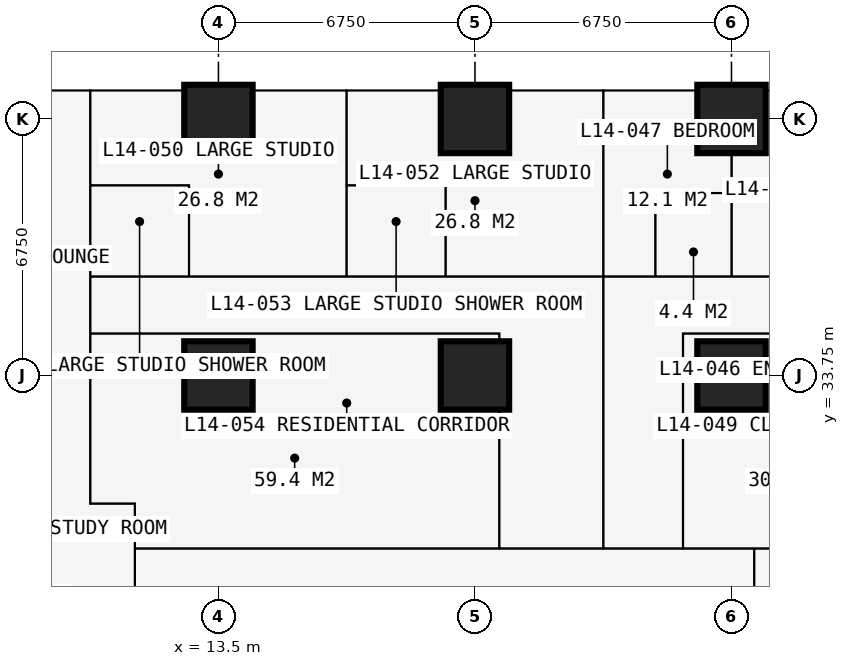
"""IFC4 building model, lengths in metres.
Left out: names, types, materials, properties, quantities, classifications, styles, units other than length and angle.
Written with IfcOpenShell. Run it as: python <this file> out.ifc"""

import sys

from ifc_helpers import new_model, si_unit, direction, frame, frame_2d, origin, origin_2d, place, context, subcontext, project, spatial, rectangle, extrude, element, fill, save


model = new_model("IFC4")
c1 = context("Model", 3, precision=1e-05, world=origin(), true_north=direction((0.0, 1.0)))
c2 = subcontext(c1, "Body", "Model", "MODEL_VIEW")
j1 = project(units=[si_unit("LENGTHUNIT", "METRE"), si_unit("PLANEANGLEUNIT", "RADIAN")], contexts=[c1])
p1 = place(None, origin())
s1 = spatial("IfcSite", under=j1, at=p1, CompositionType="ELEMENT")
p2 = place(p1, origin())
s2 = spatial("IfcBuilding", under=s1, at=p2, CompositionType="ELEMENT")
p3 = place(p2, frame((0.0, 0.0, 54.0)))
s3 = spatial("IfcBuildingStorey", under=s2, at=p3, CompositionType="ELEMENT", Elevation=54.0)
for number, where, z_axis, x_axis in (
    (1, (13.5, 33.75, 0.0), (0.0, 0.0, 1.0), (1.0, 0.0, 0.0)),
    (2, (13.5, 40.5, 0.0), (0.0, 0.0, 1.0), (1.0, 0.0, 0.0)),
    (3, (20.25, 33.75, 0.0), (0.0, 0.0, 1.0), (1.0, 0.0, 0.0)),
    (4, (20.25, 40.5, 0.0), (0.0, 0.0, 1.0), (1.0, 0.0, 0.0)),
    (5, (27.0, 33.75, 0.0), (0.0, 0.0, 1.0), (1.0, 0.0, 0.0)),
    (6, (27.0, 40.5, 0.0), (0.0, 0.0, 1.0), (1.0, 0.0, 0.0)),
):
    element("IfcColumn", number, at=place(p3, frame(where, z_axis=z_axis, x_axis=x_axis)), inside=s3, PredefinedType="COLUMN", context=c2, shape_type="SweptSolid", body=[
        extrude(rectangle(XDim=1.8, YDim=1.8, at=origin_2d()), origin(), (0.0, 0.0, 1.0), 3.6),
    ])
p4 = place(p3, frame((13.5, 41.25, 0.0), z_axis=(0.0, 0.0, 1.0), x_axis=(1.0, 0.0, 0.0)))
e7 = element("IfcWall", 7, at=p4, inside=s3, PredefinedType="SOLIDWALL", context=c2, shape_type="SweptSolid", body=[
    extrude(rectangle(XDim=6.75, YDim=0.15, at=frame_2d((3.375, 0.0))), origin(), (0.0, 0.0, 1.0), 3.375),
])
p5 = place(p4, frame((0.962, 0.0, 0.0)))
e8 = element("IfcOpeningElement", 8, at=p5, cuts=e7, PredefinedType="OPENING", context=c2, shape_type="SweptSolid", body=[
    extrude(rectangle(XDim=1.0, YDim=2.2, at=frame_2d((0.5, 1.1))), frame((0.0, 0.085, 0.0), z_axis=(0.0, -1.0, 0.0), x_axis=(1.0, 0.0, 0.0)), (0.0, 0.0, 1.0), 0.17),
])
p6 = place(p4, frame((2.025, 0.0, 0.9)))
e9 = element("IfcOpeningElement", 9, at=p6, cuts=e7, PredefinedType="OPENING", context=c2, shape_type="SweptSolid", body=[
    extrude(rectangle(XDim=1.2, YDim=1.8, at=frame_2d((0.6, 0.9))), frame((0.0, 0.085, 0.0), z_axis=(0.0, -1.0, 0.0), x_axis=(1.0, 0.0, 0.0)), (0.0, 0.0, 1.0), 0.17),
])
p7 = place(p4, frame((4.788, 0.0, 0.0)))
e10 = element("IfcOpeningElement", 10, at=p7, cuts=e7, PredefinedType="OPENING", context=c2, shape_type="SweptSolid", body=[
    extrude(rectangle(XDim=1.0, YDim=2.2, at=frame_2d((0.5, 1.1))), frame((0.0, 0.085, 0.0), z_axis=(0.0, -1.0, 0.0), x_axis=(1.0, 0.0, 0.0)), (0.0, 0.0, 1.0), 0.17),
])
p8 = place(p4, frame((3.525, 0.0, 0.9)))
e11 = element("IfcOpeningElement", 11, at=p8, cuts=e7, PredefinedType="OPENING", context=c2, shape_type="SweptSolid", body=[
    extrude(rectangle(XDim=1.2, YDim=1.8, at=frame_2d((0.6, 0.9))), frame((0.0, 0.085, 0.0), z_axis=(0.0, -1.0, 0.0), x_axis=(1.0, 0.0, 0.0)), (0.0, 0.0, 1.0), 0.17),
])
p9 = place(p3, frame((16.875, 41.35, 0.0), z_axis=(0.0, 0.0, 1.0), x_axis=(0.0, 1.0, 0.0)))
e12 = element("IfcWall", 12, at=p9, inside=s3, PredefinedType="USERDEFINED", context=c2, shape_type="SweptSolid", body=[
    extrude(rectangle(XDim=2.2, YDim=1.0, at=frame_2d((1.1, 0.0))), origin(), (0.0, 0.0, 1.0), 0.9),
])
p10 = place(p3, frame((4.15, 33.75, 0.0), z_axis=(0.0, 0.0, 1.0), x_axis=(1.0, 0.0, 0.0)))
e13 = element("IfcWall", 13, at=p10, inside=s3, PredefinedType="PARTITIONING", context=c2, shape_type="SweptSolid", body=[
    extrude(rectangle(XDim=5.975, YDim=0.15, at=frame_2d((2.988, 0.0))), origin(), (0.0, 0.0, 1.0), 2.877),
])
p11 = place(p3, frame((10.125, 30.375, 0.0), z_axis=(0.0, 0.0, 1.0), x_axis=(0.0, 1.0, 0.0)))
e14 = element("IfcWall", 14, at=p11, inside=s3, PredefinedType="PARTITIONING", context=c2, shape_type="SweptSolid", body=[
    extrude(rectangle(XDim=10.859, YDim=0.15, at=frame_2d((5.429, 0.0))), origin(), (0.0, 0.0, 1.0), 3.375),
])
p12 = place(p11, frame((4.725, 0.0, 0.0)))
e15 = element("IfcOpeningElement", 15, at=p12, cuts=e14, PredefinedType="OPENING", context=c2, shape_type="SweptSolid", body=[
    extrude(rectangle(XDim=1.0, YDim=2.2, at=frame_2d((0.5, 1.1))), frame((0.0, 0.085, 0.0), z_axis=(0.0, -1.0, 0.0), x_axis=(1.0, 0.0, 0.0)), (0.0, 0.0, 1.0), 0.17),
])
p13 = place(p3, frame((10.125, 30.375, 0.0), z_axis=(0.0, 0.0, 1.0), x_axis=(1.0, 0.0, 0.0)))
e16 = element("IfcWall", 16, at=p13, inside=s3, PredefinedType="PARTITIONING", context=c2, shape_type="SweptSolid", body=[
    extrude(rectangle(XDim=1.175, YDim=0.15, at=frame_2d((0.587, 0.0))), origin(), (0.0, 0.0, 1.0), 3.375),
])
p14 = place(p3, frame((10.125, 34.85, 0.0), z_axis=(0.0, 0.0, 1.0), x_axis=(1.0, 0.0, 0.0)))
e17 = element("IfcWall", 17, at=p14, inside=s3, PredefinedType="PARTITIONING", context=c2, shape_type="SweptSolid", body=[
    extrude(rectangle(XDim=10.762, YDim=0.15, at=frame_2d((5.381, 0.0))), origin(), (0.0, 0.0, 1.0), 3.375),
])
p15 = place(p14, frame((4.9, 0.0, 0.0)))
e18 = element("IfcOpeningElement", 18, at=p15, cuts=e17, PredefinedType="OPENING", context=c2, shape_type="SweptSolid", body=[
    extrude(rectangle(XDim=0.95, YDim=2.2, at=frame_2d((0.475, 1.1))), frame((0.0, 0.085, 0.0), z_axis=(0.0, -1.0, 0.0), x_axis=(1.0, 0.0, 0.0)), (0.0, 0.0, 1.0), 0.17),
])
p16 = place(p3, frame((10.125, 36.35, 0.0), z_axis=(0.0, 0.0, 1.0), x_axis=(1.0, 0.0, 0.0)))
e19 = element("IfcWall", 19, at=p16, inside=s3, PredefinedType="PARTITIONING", context=c2, shape_type="SweptSolid", body=[
    extrude(rectangle(XDim=23.625, YDim=0.15, at=frame_2d((11.812, 0.0))), origin(), (0.0, 0.0, 1.0), 3.375),
])
p17 = place(p16, frame((20.5, 0.0, 0.0)))
e20 = element("IfcOpeningElement", 20, at=p17, cuts=e19, PredefinedType="OPENING", context=c2, shape_type="SweptSolid", body=[
    extrude(rectangle(XDim=0.95, YDim=2.2, at=frame_2d((0.475, 1.1))), frame((0.0, 0.085, 0.0), z_axis=(0.0, -1.0, 0.0), x_axis=(1.0, 0.0, 0.0)), (0.0, 0.0, 1.0), 0.17),
])
p18 = place(p16, frame((17.125, 0.0, 0.0)))
e21 = element("IfcOpeningElement", 21, at=p18, cuts=e19, PredefinedType="OPENING", context=c2, shape_type="SweptSolid", body=[
    extrude(rectangle(XDim=0.95, YDim=2.2, at=frame_2d((0.475, 1.1))), frame((0.0, 0.085, 0.0), z_axis=(0.0, -1.0, 0.0), x_axis=(1.0, 0.0, 0.0)), (0.0, 0.0, 1.0), 0.17),
])
p19 = place(p16, frame((13.7, 0.0, 0.0)))
e22 = element("IfcOpeningElement", 22, at=p19, cuts=e19, PredefinedType="OPENING", context=c2, shape_type="SweptSolid", body=[
    extrude(rectangle(XDim=0.95, YDim=2.2, at=frame_2d((0.475, 1.1))), frame((0.0, 0.085, 0.0), z_axis=(0.0, -1.0, 0.0), x_axis=(1.0, 0.0, 0.0)), (0.0, 0.0, 1.0), 0.17),
])
p20 = place(p16, frame((4.2, 0.0, 0.0)))
e23 = element("IfcOpeningElement", 23, at=p20, cuts=e19, PredefinedType="OPENING", context=c2, shape_type="SweptSolid", body=[
    extrude(rectangle(XDim=0.95, YDim=2.2, at=frame_2d((0.475, 1.1))), frame((0.0, 0.085, 0.0), z_axis=(0.0, -1.0, 0.0), x_axis=(1.0, 0.0, 0.0)), (0.0, 0.0, 1.0), 0.17),
])
p21 = place(p16, frame((10.95, 0.0, 0.0)))
e24 = element("IfcOpeningElement", 24, at=p21, cuts=e19, PredefinedType="OPENING", context=c2, shape_type="SweptSolid", body=[
    extrude(rectangle(XDim=0.95, YDim=2.2, at=frame_2d((0.475, 1.1))), frame((0.0, 0.085, 0.0), z_axis=(0.0, -1.0, 0.0), x_axis=(1.0, 0.0, 0.0)), (0.0, 0.0, 1.0), 0.17),
])
p22 = place(p3, frame((10.125, 38.75, 0.0), z_axis=(0.0, 0.0, 1.0), x_axis=(1.0, 0.0, 0.0)))
e25 = element("IfcWall", 25, at=p22, inside=s3, PredefinedType="PARTITIONING", context=c2, shape_type="SweptSolid", body=[
    extrude(rectangle(XDim=2.6, YDim=0.1, at=frame_2d((1.3, 0.0))), origin(), (0.0, 0.0, 1.0), 3.375),
])
p23 = place(p22, frame((0.85, 0.0, 0.0)))
e26 = element("IfcOpeningElement", 26, at=p23, cuts=e25, PredefinedType="OPENING", context=c2, shape_type="SweptSolid", body=[
    extrude(rectangle(XDim=0.9, YDim=2.2, at=frame_2d((0.45, 1.1))), frame((0.0, 0.06, 0.0), z_axis=(0.0, -1.0, 0.0), x_axis=(1.0, 0.0, 0.0)), (0.0, 0.0, 1.0), 0.12),
])
p24 = place(p3, frame((11.3, 11.3, 0.0), z_axis=(0.0, 0.0, 1.0), x_axis=(0.0, 1.0, 0.0)))
e27 = element("IfcWall", 27, at=p24, inside=s3, PredefinedType="PARTITIONING", context=c2, shape_type="SweptSolid", body=[
    extrude(rectangle(XDim=19.075, YDim=0.15, at=frame_2d((9.538, 0.0))), origin(), (0.0, 0.0, 1.0), 3.375),
])
p25 = place(p24, frame((10.137, 0.0, 0.0)))
e28 = element("IfcOpeningElement", 28, at=p25, cuts=e27, PredefinedType="OPENING", context=c2, shape_type="SweptSolid", body=[
    extrude(rectangle(XDim=1.0, YDim=2.2, at=frame_2d((0.5, 1.1))), frame((0.0, 0.085, 0.0), z_axis=(0.0, -1.0, 0.0), x_axis=(1.0, 0.0, 0.0)), (0.0, 0.0, 1.0), 0.17),
])
p26 = place(p3, frame((11.3, 29.2, 0.0), z_axis=(0.0, 0.0, 1.0), x_axis=(1.0, 0.0, 0.0)))
e29 = element("IfcWall", 29, at=p26, inside=s3, PredefinedType="PARTITIONING", context=c2, shape_type="SweptSolid", body=[
    extrude(rectangle(XDim=19.075, YDim=0.15, at=frame_2d((9.538, 0.0))), origin(), (0.0, 0.0, 1.0), 3.375),
])
p27 = place(p26, frame((12.875, 0.0, 0.0)))
e30 = element("IfcOpeningElement", 30, at=p27, cuts=e29, PredefinedType="OPENING", context=c2, shape_type="SweptSolid", body=[
    extrude(rectangle(XDim=1.0, YDim=2.2, at=frame_2d((0.5, 1.1))), frame((0.0, 0.085, 0.0), z_axis=(0.0, -1.0, 0.0), x_axis=(1.0, 0.0, 0.0)), (0.0, 0.0, 1.0), 0.17),
])
p28 = place(p26, frame((10.438, 0.0, 0.0)))
e31 = element("IfcOpeningElement", 31, at=p28, cuts=e29, PredefinedType="OPENING", context=c2, shape_type="SweptSolid", body=[
    extrude(rectangle(XDim=1.0, YDim=2.2, at=frame_2d((0.5, 1.1))), frame((0.0, 0.085, 0.0), z_axis=(0.0, -1.0, 0.0), x_axis=(1.0, 0.0, 0.0)), (0.0, 0.0, 1.0), 0.17),
])
p29 = place(p26, frame((14.875, 0.0, 0.0)))
e32 = element("IfcOpeningElement", 32, at=p29, cuts=e29, PredefinedType="OPENING", context=c2, shape_type="SweptSolid", body=[
    extrude(rectangle(XDim=0.95, YDim=2.2, at=frame_2d((0.475, 1.1))), frame((0.0, 0.085, 0.0), z_axis=(0.0, -1.0, 0.0), x_axis=(1.0, 0.0, 0.0)), (0.0, 0.0, 1.0), 0.17),
])
p30 = place(p3, frame((12.725, 36.35, 0.0), z_axis=(0.0, 0.0, 1.0), x_axis=(0.0, 1.0, 0.0)))
e33 = element("IfcWall", 33, at=p30, inside=s3, PredefinedType="PARTITIONING", context=c2, shape_type="SweptSolid", body=[
    extrude(rectangle(XDim=2.4, YDim=0.1, at=frame_2d((1.2, 0.0))), origin(), (0.0, 0.0, 1.0), 3.375),
])
p31 = place(p3, frame((16.875, 36.35, 0.0), z_axis=(0.0, 0.0, 1.0), x_axis=(0.0, 1.0, 0.0)))
e34 = element("IfcWall", 34, at=p31, inside=s3, PredefinedType="PARTITIONING", context=c2, shape_type="SweptSolid", body=[
    extrude(rectangle(XDim=4.884, YDim=0.175, at=frame_2d((2.442, 0.0))), origin(), (0.0, 0.0, 1.0), 3.375),
])
p32 = place(p31, frame((0.75, 0.0, 0.0)))
e35 = element("IfcOpeningElement", 35, at=p32, cuts=e34, PredefinedType="OPENING", context=c2, shape_type="SweptSolid", body=[
    extrude(rectangle(XDim=0.9, YDim=2.2, at=frame_2d((0.45, 1.1))), frame((0.0, 0.097, 0.0), z_axis=(0.0, -1.0, 0.0), x_axis=(1.0, 0.0, 0.0)), (0.0, 0.0, 1.0), 0.195),
])
p33 = place(p3, frame((16.875, 38.75, 0.0), z_axis=(0.0, 0.0, 1.0), x_axis=(1.0, 0.0, 0.0)))
e36 = element("IfcWall", 36, at=p33, inside=s3, PredefinedType="PARTITIONING", context=c2, shape_type="SweptSolid", body=[
    extrude(rectangle(XDim=2.6, YDim=0.1, at=frame_2d((1.3, 0.0))), origin(), (0.0, 0.0, 1.0), 3.375),
])
p34 = place(p3, frame((19.475, 36.35, 0.0), z_axis=(0.0, 0.0, 1.0), x_axis=(0.0, 1.0, 0.0)))
e37 = element("IfcWall", 37, at=p34, inside=s3, PredefinedType="PARTITIONING", context=c2, shape_type="SweptSolid", body=[
    extrude(rectangle(XDim=2.4, YDim=0.1, at=frame_2d((1.2, 0.0))), origin(), (0.0, 0.0, 1.0), 3.375),
])
p35 = place(p3, frame((20.887, 29.2, 0.0), z_axis=(0.0, 0.0, 1.0), x_axis=(0.0, 1.0, 0.0)))
e38 = element("IfcWall", 38, at=p35, inside=s3, PredefinedType="PARTITIONING", context=c2, shape_type="SweptSolid", body=[
    extrude(rectangle(XDim=5.65, YDim=0.15, at=frame_2d((2.825, 0.0))), origin(), (0.0, 0.0, 1.0), 3.375),
])
p36 = place(p3, frame((23.625, 29.2, 0.0), z_axis=(0.0, 0.0, 1.0), x_axis=(0.0, 1.0, 0.0)))
e39 = element("IfcWall", 39, at=p36, inside=s3, PredefinedType="PARTITIONING", context=c2, shape_type="SweptSolid", body=[
    extrude(rectangle(XDim=12.034, YDim=0.15, at=frame_2d((6.017, 0.0))), origin(), (0.0, 0.0, 1.0), 3.375),
])
p37 = place(p3, frame((25.0, 36.35, 0.0), z_axis=(0.0, 0.0, 1.0), x_axis=(0.0, 1.0, 0.0)))
e40 = element("IfcWall", 40, at=p37, inside=s3, PredefinedType="PARTITIONING", context=c2, shape_type="SweptSolid", body=[
    extrude(rectangle(XDim=2.2, YDim=0.1, at=frame_2d((1.1, 0.0))), origin(), (0.0, 0.0, 1.0), 3.375),
])
p38 = place(p3, frame((25.0, 38.55, 0.0), z_axis=(0.0, 0.0, 1.0), x_axis=(1.0, 0.0, 0.0)))
e41 = element("IfcWall", 41, at=p38, inside=s3, PredefinedType="PARTITIONING", context=c2, shape_type="SweptSolid", body=[
    extrude(rectangle(XDim=2.0, YDim=0.1, at=frame_2d((1.0, 0.0))), origin(), (0.0, 0.0, 1.0), 3.375),
])
p39 = place(p3, frame((25.725, 29.2, 0.0), z_axis=(0.0, 0.0, 1.0), x_axis=(0.0, 1.0, 0.0)))
e42 = element("IfcWall", 42, at=p39, inside=s3, PredefinedType="PARTITIONING", context=c2, shape_type="SweptSolid", body=[
    extrude(rectangle(XDim=5.65, YDim=0.15, at=frame_2d((2.825, 0.0))), origin(), (0.0, 0.0, 1.0), 3.375),
])
p40 = place(p3, frame((25.725, 34.85, 0.0), z_axis=(0.0, 0.0, 1.0), x_axis=(1.0, 0.0, 0.0)))
e43 = element("IfcWall", 43, at=p40, inside=s3, PredefinedType="PARTITIONING", context=c2, shape_type="SweptSolid", body=[
    extrude(rectangle(XDim=5.575, YDim=0.15, at=frame_2d((2.788, 0.0))), origin(), (0.0, 0.0, 1.0), 3.375),
])
p41 = place(p3, frame((27.0, 36.35, 0.0), z_axis=(0.0, 0.0, 1.0), x_axis=(0.0, 1.0, 0.0)))
e44 = element("IfcWall", 44, at=p41, inside=s3, PredefinedType="PARTITIONING", context=c2, shape_type="SweptSolid", body=[
    extrude(rectangle(XDim=4.884, YDim=0.175, at=frame_2d((2.442, 0.0))), origin(), (0.0, 0.0, 1.0), 2.61),
])
p42 = place(p41, frame((0.65, 0.0, 0.0)))
e45 = element("IfcOpeningElement", 45, at=p42, cuts=e44, PredefinedType="OPENING", context=c2, shape_type="SweptSolid", body=[
    extrude(rectangle(XDim=0.9, YDim=2.2, at=frame_2d((0.45, 1.1))), frame((0.0, 0.097, 0.0), z_axis=(0.0, -1.0, 0.0), x_axis=(1.0, 0.0, 0.0)), (0.0, 0.0, 1.0), 0.195),
])
p43 = place(p3, frame((27.6, 27.6, 0.0), z_axis=(0.0, 0.0, 1.0), x_axis=(0.0, 1.0, 0.0)))
e46 = element("IfcWall", 46, at=p43, inside=s3, PredefinedType="PARTITIONING", context=c2, shape_type="SweptSolid", body=[
    extrude(rectangle(XDim=1.6, YDim=0.15, at=frame_2d((0.8, 0.0))), origin(), (0.0, 0.0, 1.0), 3.375),
])
p44 = place(p43, frame((0.3, 0.0, 0.0)))
e47 = element("IfcOpeningElement", 47, at=p44, cuts=e46, PredefinedType="OPENING", context=c2, shape_type="SweptSolid", body=[
    extrude(rectangle(XDim=0.95, YDim=2.2, at=frame_2d((0.475, 1.1))), frame((0.0, 0.085, 0.0), z_axis=(0.0, -1.0, 0.0), x_axis=(1.0, 0.0, 0.0)), (0.0, 0.0, 1.0), 0.17),
])
p45 = place(p5, origin())
e48 = element("IfcDoor", 48, at=p45, inside=s3, OperationType="SINGLE_SWING_LEFT", PredefinedType="DOOR", context=c2, shape_type="SweptSolid", body=[
    extrude(rectangle(XDim=1.0, YDim=2.2, at=frame_2d((0.5, 1.1))), frame((0.0, 0.025, 0.0), z_axis=(0.0, -1.0, 0.0), x_axis=(1.0, 0.0, 0.0)), (0.0, 0.0, 1.0), 0.05),
])
fill(e8, e48)
p46 = place(p6, origin())
e49 = element("IfcWindow", 49, at=p46, inside=s3, PartitioningType="SINGLE_PANEL", PredefinedType="WINDOW", context=c2, shape_type="SweptSolid", body=[
    extrude(rectangle(XDim=1.2, YDim=1.8, at=frame_2d((0.6, 0.9))), frame((0.0, 0.03, 0.0), z_axis=(0.0, -1.0, 0.0), x_axis=(1.0, 0.0, 0.0)), (0.0, 0.0, 1.0), 0.06),
])
fill(e9, e49)
p47 = place(p7, origin())
e50 = element("IfcDoor", 50, at=p47, inside=s3, OperationType="SINGLE_SWING_RIGHT", PredefinedType="DOOR", context=c2, shape_type="SweptSolid", body=[
    extrude(rectangle(XDim=1.0, YDim=2.2, at=frame_2d((0.5, 1.1))), frame((0.0, 0.025, 0.0), z_axis=(0.0, -1.0, 0.0), x_axis=(1.0, 0.0, 0.0)), (0.0, 0.0, 1.0), 0.05),
])
fill(e10, e50)
p48 = place(p8, origin())
e51 = element("IfcWindow", 51, at=p48, inside=s3, PartitioningType="SINGLE_PANEL", PredefinedType="WINDOW", context=c2, shape_type="SweptSolid", body=[
    extrude(rectangle(XDim=1.2, YDim=1.8, at=frame_2d((0.6, 0.9))), frame((0.0, 0.03, 0.0), z_axis=(0.0, -1.0, 0.0), x_axis=(1.0, 0.0, 0.0)), (0.0, 0.0, 1.0), 0.06),
])
fill(e11, e51)
p49 = place(p44, origin())
e52 = element("IfcDoor", 52, at=p49, inside=s3, OperationType="SINGLE_SWING_LEFT", PredefinedType="DOOR", context=c2, shape_type="SweptSolid", body=[
    extrude(rectangle(XDim=0.95, YDim=2.2, at=frame_2d((0.475, 1.1))), frame((0.0, 0.025, 0.0), z_axis=(0.0, -1.0, 0.0), x_axis=(1.0, 0.0, 0.0)), (0.0, 0.0, 1.0), 0.05),
])
fill(e47, e52)
p50 = place(p18, origin())
e53 = element("IfcDoor", 53, at=p50, inside=s3, OperationType="SINGLE_SWING_LEFT", PredefinedType="DOOR", context=c2, shape_type="SweptSolid", body=[
    extrude(rectangle(XDim=0.95, YDim=2.2, at=frame_2d((0.475, 1.1))), frame((0.0, 0.025, 0.0), z_axis=(0.0, -1.0, 0.0), x_axis=(1.0, 0.0, 0.0)), (0.0, 0.0, 1.0), 0.05),
])
fill(e21, e53)
p51 = place(p19, origin())
e54 = element("IfcDoor", 54, at=p51, inside=s3, OperationType="SINGLE_SWING_LEFT", PredefinedType="DOOR", context=c2, shape_type="SweptSolid", body=[
    extrude(rectangle(XDim=0.95, YDim=2.2, at=frame_2d((0.475, 1.1))), frame((0.0, 0.025, 0.0), z_axis=(0.0, -1.0, 0.0), x_axis=(1.0, 0.0, 0.0)), (0.0, 0.0, 1.0), 0.05),
])
fill(e22, e54)
p52 = place(p42, origin())
e55 = element("IfcDoor", 55, at=p52, inside=s3, OperationType="SINGLE_SWING_RIGHT", PredefinedType="DOOR", context=c2, shape_type="SweptSolid", body=[
    extrude(rectangle(XDim=0.9, YDim=2.2, at=frame_2d((0.45, 1.1))), frame((0.0, 0.025, 0.0), z_axis=(0.0, -1.0, 0.0), x_axis=(1.0, 0.0, 0.0)), (0.0, 0.0, 1.0), 0.05),
])
fill(e45, e55)
p53 = place(p27, origin())
e56 = element("IfcDoor", 56, at=p53, inside=s3, OperationType="SINGLE_SWING_LEFT", PredefinedType="DOOR", context=c2, shape_type="SweptSolid", body=[
    extrude(rectangle(XDim=1.0, YDim=2.2, at=frame_2d((0.5, 1.1))), frame((0.0, 0.025, 0.0), z_axis=(0.0, -1.0, 0.0), x_axis=(1.0, 0.0, 0.0)), (0.0, 0.0, 1.0), 0.05),
])
fill(e30, e56)
p54 = place(p20, origin())
e57 = element("IfcDoor", 57, at=p54, inside=s3, OperationType="SINGLE_SWING_LEFT", PredefinedType="DOOR", context=c2, shape_type="SweptSolid", body=[
    extrude(rectangle(XDim=0.95, YDim=2.2, at=frame_2d((0.475, 1.1))), frame((0.0, 0.025, 0.0), z_axis=(0.0, -1.0, 0.0), x_axis=(1.0, 0.0, 0.0)), (0.0, 0.0, 1.0), 0.05),
])
fill(e23, e57)
p55 = place(p23, origin())
e58 = element("IfcDoor", 58, at=p55, inside=s3, OperationType="SINGLE_SWING_RIGHT", PredefinedType="DOOR", context=c2, shape_type="SweptSolid", body=[
    extrude(rectangle(XDim=0.9, YDim=2.2, at=frame_2d((0.45, 1.1))), frame((0.0, 0.025, 0.0), z_axis=(0.0, -1.0, 0.0), x_axis=(1.0, 0.0, 0.0)), (0.0, 0.0, 1.0), 0.05),
])
fill(e26, e58)
p56 = place(p21, origin())
e59 = element("IfcDoor", 59, at=p56, inside=s3, OperationType="SINGLE_SWING_LEFT", PredefinedType="DOOR", context=c2, shape_type="SweptSolid", body=[
    extrude(rectangle(XDim=0.95, YDim=2.2, at=frame_2d((0.475, 1.1))), frame((0.0, 0.025, 0.0), z_axis=(0.0, -1.0, 0.0), x_axis=(1.0, 0.0, 0.0)), (0.0, 0.0, 1.0), 0.05),
])
fill(e24, e59)
p57 = place(p32, origin())
e60 = element("IfcDoor", 60, at=p57, inside=s3, OperationType="SINGLE_SWING_RIGHT", PredefinedType="DOOR", context=c2, shape_type="SweptSolid", body=[
    extrude(rectangle(XDim=0.9, YDim=2.2, at=frame_2d((0.45, 1.1))), frame((0.0, 0.025, 0.0), z_axis=(0.0, -1.0, 0.0), x_axis=(1.0, 0.0, 0.0)), (0.0, 0.0, 1.0), 0.05),
])
fill(e35, e60)
p58 = place(p28, origin())
e61 = element("IfcDoor", 61, at=p58, inside=s3, OperationType="SINGLE_SWING_LEFT", PredefinedType="DOOR", context=c2, shape_type="SweptSolid", body=[
    extrude(rectangle(XDim=1.0, YDim=2.2, at=frame_2d((0.5, 1.1))), frame((0.0, 0.025, 0.0), z_axis=(0.0, -1.0, 0.0), x_axis=(1.0, 0.0, 0.0)), (0.0, 0.0, 1.0), 0.05),
])
fill(e31, e61)
p59 = place(p29, origin())
e62 = element("IfcDoor", 62, at=p59, inside=s3, OperationType="SINGLE_SWING_LEFT", PredefinedType="DOOR", context=c2, shape_type="SweptSolid", body=[
    extrude(rectangle(XDim=0.95, YDim=2.2, at=frame_2d((0.475, 1.1))), frame((0.0, 0.025, 0.0), z_axis=(0.0, -1.0, 0.0), x_axis=(1.0, 0.0, 0.0)), (0.0, 0.0, 1.0), 0.05),
])
fill(e32, e62)
p60 = place(p15, origin())
e63 = element("IfcDoor", 63, at=p60, inside=s3, OperationType="SINGLE_SWING_LEFT", PredefinedType="DOOR", context=c2, shape_type="SweptSolid", body=[
    extrude(rectangle(XDim=0.95, YDim=2.2, at=frame_2d((0.475, 1.1))), frame((0.0, 0.025, 0.0), z_axis=(0.0, -1.0, 0.0), x_axis=(1.0, 0.0, 0.0)), (0.0, 0.0, 1.0), 0.05),
])
fill(e18, e63)
p61 = place(p12, origin())
e64 = element("IfcDoor", 64, at=p61, inside=s3, OperationType="SINGLE_SWING_LEFT", PredefinedType="DOOR", context=c2, shape_type="SweptSolid", body=[
    extrude(rectangle(XDim=1.0, YDim=2.2, at=frame_2d((0.5, 1.1))), frame((0.0, 0.025, 0.0), z_axis=(0.0, -1.0, 0.0), x_axis=(1.0, 0.0, 0.0)), (0.0, 0.0, 1.0), 0.05),
])
fill(e15, e64)
save(model, sys.argv[1])
